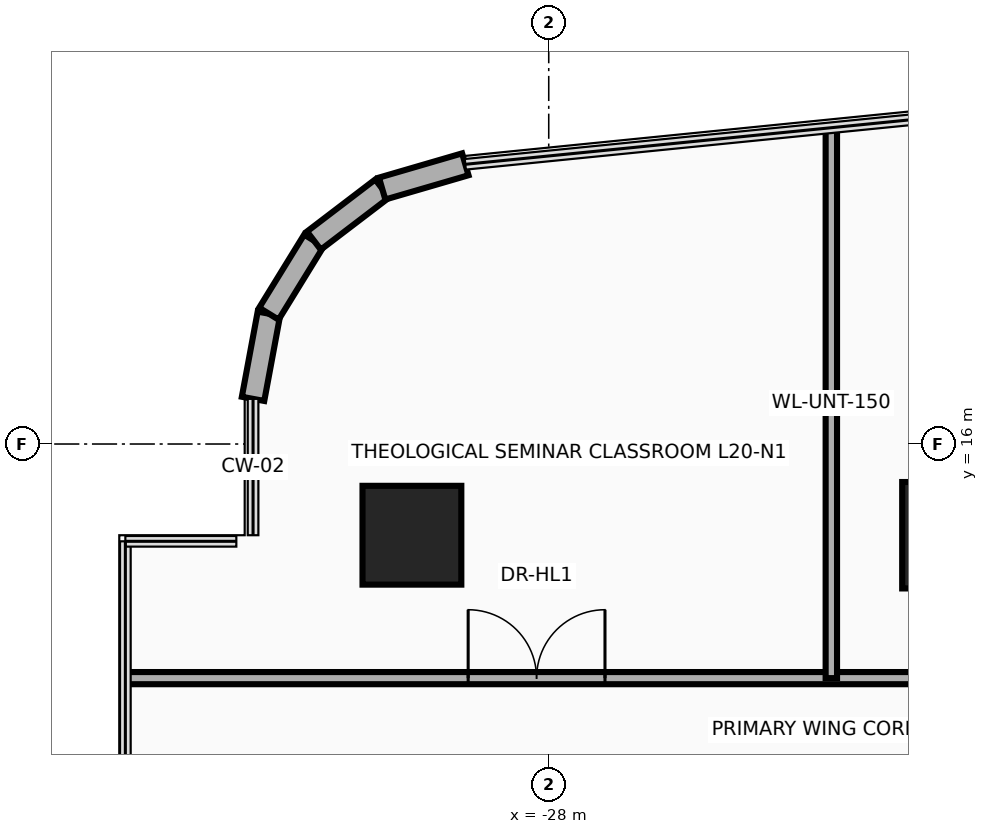
"""IFC4 building model, lengths in metres.
Left out: names, types, materials, properties, quantities, classifications, styles, units other than length and angle.
Written with IfcOpenShell. Run it as: python <this file> out.ifc"""

import sys

from ifc_helpers import new_model, si_unit, direction, frame, frame_2d, origin, origin_2d, place, context, subcontext, project, spatial, rectangle, circle, extrude, source, transform, mapped, element, fill, save


model = new_model("IFC4")
c1 = context("Model", 3, precision=1e-05, world=origin(), true_north=direction((0.0, 1.0)))
c2 = subcontext(c1, "Body", "Model", "MODEL_VIEW")
j1 = project(units=[si_unit("LENGTHUNIT", "METRE"), si_unit("PLANEANGLEUNIT", "RADIAN")], contexts=[c1])
p1 = place(None, origin())
s1 = spatial("IfcSite", under=j1, at=p1, CompositionType="ELEMENT")
p2 = place(p1, origin())
s2 = spatial("IfcBuilding", under=s1, at=p2, CompositionType="ELEMENT")
p3 = place(p2, frame((0.0, 0.0, 81.5)))
s3 = spatial("IfcBuildingStorey", under=s2, at=p3, CompositionType="ELEMENT", Elevation=81.5)
m1 = source(origin(), c2, "Body", "SweptSolid", [
    extrude(circle(Radius=0.65, at=origin_2d()), origin(), (0.0, 0.0, 1.0), 3.7),
])
p4 = place(p3, frame((-29.8, 14.8, 0.0), z_axis=(0.0, 0.0, 1.0), x_axis=(1.0, 0.0, 0.0)))
e1 = element("IfcColumn", 1, at=p4, inside=s3, PredefinedType="COLUMN", context=c2, shape_type="MappedRepresentation", body=[
    mapped(m1, transform((0.0, 0.0, 0.0), x_axis=(1.0, 0.0, 0.0), y_axis=(0.0, 1.0, 0.0), z_axis=(0.0, 0.0, 1.0), scale=1.0)),
])
m2 = source(origin(), c2, "Body", "SweptSolid", [
    extrude(rectangle(XDim=1.4, YDim=1.4, at=origin_2d()), origin(), (0.0, 0.0, 1.0), 3.7),
])
p5 = place(p3, frame((-22.65, 14.8, 0.0), z_axis=(0.0, 0.0, 1.0), x_axis=(1.0, 0.0, 0.0)))
e2 = element("IfcColumn", 2, at=p5, inside=s3, PredefinedType="COLUMN", context=c2, shape_type="MappedRepresentation", body=[
    mapped(m2, transform((0.0, 0.0, 0.0), x_axis=(1.0, 0.0, 0.0), y_axis=(0.0, 1.0, 0.0), z_axis=(0.0, 0.0, 1.0), scale=1.0)),
])
p6 = place(p3, frame((-31.89, 16.594, 0.0), z_axis=(0.0, 0.0, 1.0), x_axis=(0.182748995683, 0.9831596028, 0.0)))
e3 = element("IfcWall", 3, at=p6, inside=s3, PredefinedType="SOLIDWALL", context=c2, shape_type="SweptSolid", body=[
    extrude(rectangle(XDim=1.14, YDim=0.3, at=frame_2d((0.57, 0.0))), origin(), (0.0, 0.0, 1.0), 3.46),
])
p7 = place(p3, frame((-31.682, 17.714, 0.0), z_axis=(0.0, 0.0, 1.0), x_axis=(0.524157723014, 0.8516212077, 0.0)))
e4 = element("IfcWall", 4, at=p7, inside=s3, PredefinedType="SOLIDWALL", context=c2, shape_type="SweptSolid", body=[
    extrude(rectangle(XDim=1.129, YDim=0.3, at=frame_2d((0.565, 0.0))), origin(), (0.0, 0.0, 1.0), 3.46),
])
p8 = place(p3, frame((-31.09, 18.676, 0.0), z_axis=(0.0, 0.0, 1.0), x_axis=(0.795253002434, 0.606277710393, 0.0)))
e5 = element("IfcWall", 5, at=p8, inside=s3, PredefinedType="SOLIDWALL", context=c2, shape_type="SweptSolid", body=[
    extrude(rectangle(XDim=1.129, YDim=0.3, at=frame_2d((0.564, 0.0))), origin(), (0.0, 0.0, 1.0), 3.46),
])
p9 = place(p3, frame((-30.192, 19.361, 0.0), z_axis=(0.0, 0.0, 1.0), x_axis=(0.960071941549, 0.279753225271, 0.0)))
e6 = element("IfcWall", 6, at=p9, inside=s3, PredefinedType="SOLIDWALL", context=c2, shape_type="SweptSolid", body=[
    extrude(rectangle(XDim=1.14, YDim=0.3, at=frame_2d((0.57, 0.0))), origin(), (0.0, 0.0, 1.0), 3.46),
])
p10 = place(p3, frame((-33.54, 12.92, 0.0), z_axis=(0.0, 0.0, 1.0), x_axis=(1.0, 0.0, 0.0)))
e7 = element("IfcWall", 7, at=p10, inside=s3, PredefinedType="PARTITIONING", context=c2, shape_type="SweptSolid", body=[
    extrude(rectangle(XDim=47.09, YDim=0.16, at=frame_2d((23.545, 0.0))), origin(), (0.0, 0.0, 1.0), 2.583),
])
p11 = place(p10, frame((4.48, 0.0, 0.0)))
e8 = element("IfcOpeningElement", 8, at=p11, cuts=e7, PredefinedType="OPENING", context=c2, shape_type="SweptSolid", body=[
    extrude(rectangle(XDim=1.8, YDim=2.15, at=frame_2d((0.9, 1.075))), frame((0.0, 0.095, 0.0), z_axis=(0.0, -1.0, 0.0), x_axis=(1.0, 0.0, 0.0)), (0.0, 0.0, 1.0), 0.19),
])
p12 = place(p10, frame((13.087, 0.0, 0.0)))
e9 = element("IfcOpeningElement", 9, at=p12, cuts=e7, PredefinedType="OPENING", context=c2, shape_type="SweptSolid", body=[
    extrude(rectangle(XDim=1.8, YDim=2.15, at=frame_2d((0.9, 1.075))), frame((0.0, 0.095, 0.0), z_axis=(0.0, -1.0, 0.0), x_axis=(1.0, 0.0, 0.0)), (0.0, 0.0, 1.0), 0.19),
])
p13 = place(p10, frame((22.545, 0.0, 0.0)))
e10 = element("IfcOpeningElement", 10, at=p13, cuts=e7, PredefinedType="OPENING", context=c2, shape_type="SweptSolid", body=[
    extrude(rectangle(XDim=1.8, YDim=2.15, at=frame_2d((0.9, 1.075))), frame((0.0, 0.095, 0.0), z_axis=(0.0, -1.0, 0.0), x_axis=(1.0, 0.0, 0.0)), (0.0, 0.0, 1.0), 0.19),
])
p14 = place(p10, frame((32.003, 0.0, 0.0)))
e11 = element("IfcOpeningElement", 11, at=p14, cuts=e7, PredefinedType="OPENING", context=c2, shape_type="SweptSolid", body=[
    extrude(rectangle(XDim=1.8, YDim=2.15, at=frame_2d((0.9, 1.075))), frame((0.0, 0.095, 0.0), z_axis=(0.0, -1.0, 0.0), x_axis=(1.0, 0.0, 0.0)), (0.0, 0.0, 1.0), 0.19),
])
p15 = place(p10, frame((41.461, 0.0, 0.0)))
e12 = element("IfcOpeningElement", 12, at=p15, cuts=e7, PredefinedType="OPENING", context=c2, shape_type="SweptSolid", body=[
    extrude(rectangle(XDim=1.8, YDim=2.15, at=frame_2d((0.9, 1.075))), frame((0.0, 0.095, 0.0), z_axis=(0.0, -1.0, 0.0), x_axis=(1.0, 0.0, 0.0)), (0.0, 0.0, 1.0), 0.19),
])
p16 = place(p3, frame((-24.282, 12.92, 0.0), z_axis=(0.0, 0.0, 1.0), x_axis=(0.0, 1.0, 0.0)))
e13 = element("IfcWall", 13, at=p16, inside=s3, PredefinedType="PARTITIONING", context=c2, shape_type="SweptSolid", body=[
    extrude(rectangle(XDim=7.241, YDim=0.15, at=frame_2d((3.621, 0.0))), origin(), (0.0, 0.0, 1.0), 2.583),
])
p17 = place(p11, origin())
e14 = element("IfcDoor", 14, at=p17, inside=s3, OperationType="DOUBLE_DOOR_SINGLE_SWING", PredefinedType="DOOR", context=c2, shape_type="SweptSolid", body=[
    extrude(rectangle(XDim=1.8, YDim=2.15, at=frame_2d((0.9, 1.075))), frame((0.0, 0.025, 0.0), z_axis=(0.0, -1.0, 0.0), x_axis=(1.0, 0.0, 0.0)), (0.0, 0.0, 1.0), 0.05),
])
fill(e8, e14)
save(model, sys.argv[1])
